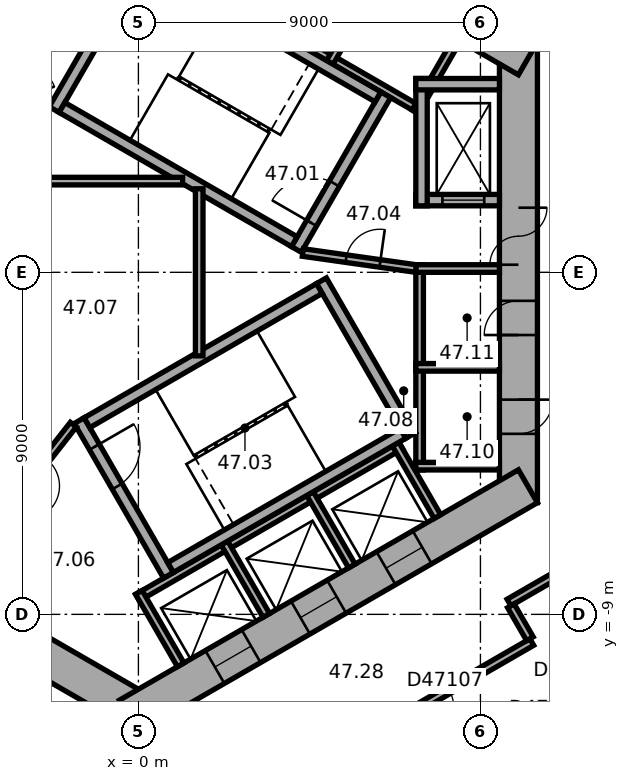
"""IFC4 building model, lengths in metres.
Left out: names, types, materials, properties, quantities, classifications, styles, units other than length and angle.
Written with IfcOpenShell. Run it as: python <this file> out.ifc"""

import sys

from ifc_helpers import new_model, si_unit, direction, frame, frame_2d, origin, place, context, subcontext, project, spatial, rectangle, extrude, element, fill, save


model = new_model("IFC4")
c1 = context("Model", 3, precision=1e-05, world=origin(), true_north=direction((0.0, 1.0)))
c2 = subcontext(c1, "Body", "Model", "MODEL_VIEW")
j1 = project(units=[si_unit("LENGTHUNIT", "METRE"), si_unit("PLANEANGLEUNIT", "RADIAN")], contexts=[c1])
p1 = place(None, origin())
s1 = spatial("IfcSite", under=j1, at=p1, CompositionType="ELEMENT")
p2 = place(p1, origin())
s2 = spatial("IfcBuilding", under=s1, at=p2, CompositionType="ELEMENT")
p3 = place(p2, frame((0.0, 0.0, 191.0)))
s3 = spatial("IfcBuildingStorey", under=s2, at=p3, CompositionType="ELEMENT", Elevation=191.0)
p4 = place(p3, frame((10.0, -6.062, 0.0), z_axis=(0.0, 0.0, 1.0), x_axis=(0.0, 1.0, 0.0)))
e1 = element("IfcWall", 1, at=p4, inside=s3, PredefinedType="SHEAR", context=c2, shape_type="SweptSolid", body=[
    extrude(rectangle(XDim=12.125, YDim=1.0, at=frame_2d((6.062, 0.0))), origin(), (0.0, 0.0, 1.0), 3.7),
])
p5 = place(p4, frame((6.262, 0.0, 0.0)))
e2 = element("IfcOpeningElement", 2, at=p5, cuts=e1, PredefinedType="OPENING", context=c2, shape_type="SweptSolid", body=[
    extrude(rectangle(XDim=1.5, YDim=2.1, at=frame_2d((0.75, 1.05))), frame((0.0, 0.51, 0.0), z_axis=(0.0, -1.0, 0.0), x_axis=(1.0, 0.0, 0.0)), (0.0, 0.0, 1.0), 1.02),
])
p6 = place(p4, frame((1.812, 0.0, 0.0)))
e3 = element("IfcOpeningElement", 3, at=p6, cuts=e1, PredefinedType="OPENING", context=c2, shape_type="SweptSolid", body=[
    extrude(rectangle(XDim=0.9, YDim=2.1, at=frame_2d((0.45, 1.05))), frame((0.0, 0.51, 0.0), z_axis=(0.0, -1.0, 0.0), x_axis=(1.0, 0.0, 0.0)), (0.0, 0.0, 1.0), 1.02),
])
p7 = place(p4, frame((4.412, 0.0, 0.0)))
e4 = element("IfcOpeningElement", 4, at=p7, cuts=e1, PredefinedType="OPENING", context=c2, shape_type="SweptSolid", body=[
    extrude(rectangle(XDim=0.9, YDim=2.1, at=frame_2d((0.45, 1.05))), frame((0.0, 0.51, 0.0), z_axis=(0.0, -1.0, 0.0), x_axis=(1.0, 0.0, 0.0)), (0.0, 0.0, 1.0), 1.02),
])
p8 = place(p3, frame((10.25, 5.629, 0.0), z_axis=(0.0, 0.0, 1.0), x_axis=(-0.866022616891, 0.50000482701, 0.0)))
e5 = element("IfcWall", 5, at=p8, inside=s3, PredefinedType="SHEAR", context=c2, shape_type="SweptSolid", body=[
    extrude(rectangle(XDim=12.125, YDim=1.0, at=frame_2d((6.062, 0.0))), origin(), (0.0, 0.0, 1.0), 3.7),
])
p9 = place(p8, frame((2.712, 0.0, 0.0)))
e6 = element("IfcOpeningElement", 6, at=p9, cuts=e5, PredefinedType="OPENING", context=c2, shape_type="SweptSolid", body=[
    extrude(rectangle(XDim=0.9, YDim=2.1, at=frame_2d((0.45, 1.05))), frame((0.0, 0.51, 0.0), z_axis=(0.0, -1.0, 0.0), x_axis=(1.0, 0.0, 0.0)), (0.0, 0.0, 1.0), 1.02),
])
p10 = place(p8, frame((6.612, 0.0, 0.0)))
e7 = element("IfcOpeningElement", 7, at=p10, cuts=e5, PredefinedType="OPENING", context=c2, shape_type="SweptSolid", body=[
    extrude(rectangle(XDim=0.9, YDim=2.1, at=frame_2d((0.45, 1.05))), frame((0.0, 0.51, 0.0), z_axis=(0.0, -1.0, 0.0), x_axis=(1.0, 0.0, 0.0)), (0.0, 0.0, 1.0), 1.02),
])
p11 = place(p3, frame((0.25, 11.691, 0.0), z_axis=(0.0, 0.0, 1.0), x_axis=(-0.866022616891, -0.50000482701, 0.0)))
e8 = element("IfcWall", 8, at=p11, inside=s3, PredefinedType="SHEAR", context=c2, shape_type="SweptSolid", body=[
    extrude(rectangle(XDim=12.125, YDim=1.0, at=frame_2d((6.062, 0.0))), origin(), (0.0, 0.0, 1.0), 3.7),
])
p12 = place(p11, frame((6.262, 0.0, 0.0)))
e9 = element("IfcOpeningElement", 9, at=p12, cuts=e8, PredefinedType="OPENING", context=c2, shape_type="SweptSolid", body=[
    extrude(rectangle(XDim=1.5, YDim=2.1, at=frame_2d((0.75, 1.05))), frame((0.0, 0.51, 0.0), z_axis=(0.0, -1.0, 0.0), x_axis=(1.0, 0.0, 0.0)), (0.0, 0.0, 1.0), 1.02),
])
p13 = place(p11, frame((1.812, 0.0, 0.0)))
e10 = element("IfcOpeningElement", 10, at=p13, cuts=e8, PredefinedType="OPENING", context=c2, shape_type="SweptSolid", body=[
    extrude(rectangle(XDim=0.9, YDim=2.1, at=frame_2d((0.45, 1.05))), frame((0.0, 0.51, 0.0), z_axis=(0.0, -1.0, 0.0), x_axis=(1.0, 0.0, 0.0)), (0.0, 0.0, 1.0), 1.02),
])
p14 = place(p11, frame((4.412, 0.0, 0.0)))
e11 = element("IfcOpeningElement", 11, at=p14, cuts=e8, PredefinedType="OPENING", context=c2, shape_type="SweptSolid", body=[
    extrude(rectangle(XDim=0.9, YDim=2.1, at=frame_2d((0.45, 1.05))), frame((0.0, 0.51, 0.0), z_axis=(0.0, -1.0, 0.0), x_axis=(1.0, 0.0, 0.0)), (0.0, 0.0, 1.0), 1.02),
])
p15 = place(p3, frame((-10.25, -5.629, 0.0), z_axis=(0.0, 0.0, 1.0), x_axis=(0.866022616891, -0.50000482701, 0.0)))
e12 = element("IfcWall", 12, at=p15, inside=s3, PredefinedType="SHEAR", context=c2, shape_type="SweptSolid", body=[
    extrude(rectangle(XDim=12.125, YDim=1.0, at=frame_2d((6.062, 0.0))), origin(), (0.0, 0.0, 1.0), 3.7),
])
p16 = place(p15, frame((6.262, 0.0, 0.0)))
e13 = element("IfcOpeningElement", 13, at=p16, cuts=e12, PredefinedType="OPENING", context=c2, shape_type="SweptSolid", body=[
    extrude(rectangle(XDim=1.5, YDim=2.1, at=frame_2d((0.75, 1.05))), frame((0.0, 0.51, 0.0), z_axis=(0.0, -1.0, 0.0), x_axis=(1.0, 0.0, 0.0)), (0.0, 0.0, 1.0), 1.02),
])
p17 = place(p15, frame((1.712, 0.0, 0.0)))
e14 = element("IfcOpeningElement", 14, at=p17, cuts=e12, PredefinedType="OPENING", context=c2, shape_type="SweptSolid", body=[
    extrude(rectangle(XDim=1.1, YDim=2.1, at=frame_2d((0.55, 1.05))), frame((0.0, 0.51, 0.0), z_axis=(0.0, -1.0, 0.0), x_axis=(1.0, 0.0, 0.0)), (0.0, 0.0, 1.0), 1.02),
])
p18 = place(p15, frame((4.312, 0.0, 0.0)))
e15 = element("IfcOpeningElement", 15, at=p18, cuts=e12, PredefinedType="OPENING", context=c2, shape_type="SweptSolid", body=[
    extrude(rectangle(XDim=1.1, YDim=2.1, at=frame_2d((0.55, 1.05))), frame((0.0, 0.51, 0.0), z_axis=(0.0, -1.0, 0.0), x_axis=(1.0, 0.0, 0.0)), (0.0, 0.0, 1.0), 1.02),
])
p19 = place(p3, frame((-0.25, -11.691, 0.0), z_axis=(0.0, 0.0, 1.0), x_axis=(0.866022616891, 0.50000482701, 0.0)))
e16 = element("IfcWall", 16, at=p19, inside=s3, PredefinedType="SHEAR", context=c2, shape_type="SweptSolid", body=[
    extrude(rectangle(XDim=12.125, YDim=1.0, at=frame_2d((6.062, 0.0))), origin(), (0.0, 0.0, 1.0), 3.7),
])
p20 = place(p19, frame((2.612, 0.0, 0.0)))
e17 = element("IfcOpeningElement", 17, at=p20, cuts=e16, PredefinedType="OPENING", context=c2, shape_type="SweptSolid", body=[
    extrude(rectangle(XDim=1.1, YDim=2.1, at=frame_2d((0.55, 1.05))), frame((0.0, 0.51, 0.0), z_axis=(0.0, -1.0, 0.0), x_axis=(1.0, 0.0, 0.0)), (0.0, 0.0, 1.0), 1.02),
])
p21 = place(p19, frame((5.212, 0.0, 0.0)))
e18 = element("IfcOpeningElement", 18, at=p21, cuts=e16, PredefinedType="OPENING", context=c2, shape_type="SweptSolid", body=[
    extrude(rectangle(XDim=1.1, YDim=2.1, at=frame_2d((0.55, 1.05))), frame((0.0, 0.51, 0.0), z_axis=(0.0, -1.0, 0.0), x_axis=(1.0, 0.0, 0.0)), (0.0, 0.0, 1.0), 1.02),
])
p22 = place(p19, frame((7.812, 0.0, 0.0)))
e19 = element("IfcOpeningElement", 19, at=p22, cuts=e16, PredefinedType="OPENING", context=c2, shape_type="SweptSolid", body=[
    extrude(rectangle(XDim=1.1, YDim=2.1, at=frame_2d((0.55, 1.05))), frame((0.0, 0.51, 0.0), z_axis=(0.0, -1.0, 0.0), x_axis=(1.0, 0.0, 0.0)), (0.0, 0.0, 1.0), 1.02),
])
p23 = place(p3, frame((7.4, -5.2, 0.0), z_axis=(0.0, 0.0, 1.0), x_axis=(0.0, 1.0, 0.0)))
e20 = element("IfcWall", 20, at=p23, inside=s3, PredefinedType="PARTITIONING", context=c2, shape_type="SweptSolid", body=[
    extrude(rectangle(XDim=5.4, YDim=0.2, at=frame_2d((2.7, 0.0))), origin(), (0.0, 0.0, 1.0), 3.42),
])
for number, where, z_axis, x_axis in (
    (21, (7.3, -5.1, 0.0), (0.0, 0.0, 1.0), (1.0, 0.0, 0.0)),
    (22, (7.3, -2.5, 0.0), (0.0, 0.0, 1.0), (1.0, 0.0, 0.0)),
    (23, (7.3, 0.1, 0.0), (0.0, 0.0, 1.0), (1.0, 0.0, 0.0)),
):
    element("IfcWall", number, at=place(p3, frame(where, z_axis=z_axis, x_axis=x_axis)), inside=s3, PredefinedType="PARTITIONING", context=c2, shape_type="SweptSolid", body=[
        extrude(rectangle(XDim=2.2, YDim=0.2, at=frame_2d((1.1, 0.0))), origin(), (0.0, 0.0, 1.0), 3.42),
    ])
p24 = place(p3, frame((7.424, 4.259, 0.0), z_axis=(0.0, 0.0, 1.0), x_axis=(-0.866026010844, 0.49999894854, 0.0)))
e24 = element("IfcWall", 24, at=p24, inside=s3, PredefinedType="PARTITIONING", context=c2, shape_type="SweptSolid", body=[
    extrude(rectangle(XDim=8.0, YDim=0.2, at=frame_2d((4.0, 0.0))), origin(), (0.0, 0.0, 1.0), 3.42),
])
for number, where, z_axis, x_axis in (
    (25, (7.287, 4.222, 0.0), (0.0, 0.0, 1.0), (0.5, 0.866, 0.0)),
    (26, (5.036, 5.522, 0.0), (0.0, 0.0, 1.0), (0.5, 0.866, 0.0)),
):
    element("IfcWall", number, at=place(p3, frame(where, z_axis=z_axis, x_axis=x_axis)), inside=s3, PredefinedType="PARTITIONING", context=c2, shape_type="SweptSolid", body=[
        extrude(rectangle(XDim=2.2, YDim=0.2, at=frame_2d((1.1, 0.0))), origin(), (0.0, 0.0, 1.0), 3.42),
    ])
p25 = place(p3, frame((-0.024, -8.559, 0.0), z_axis=(0.0, 0.0, 1.0), x_axis=(0.866026010844, 0.49999894854, 0.0)))
e27 = element("IfcWall", 27, at=p25, inside=s3, PredefinedType="PARTITIONING", context=c2, shape_type="SweptSolid", body=[
    extrude(rectangle(XDim=8.0, YDim=0.2, at=frame_2d((4.0, 0.0))), origin(), (0.0, 0.0, 1.0), 3.42),
])
for number, where, z_axis, x_axis in (
    (28, (0.013, -8.422, 0.0), (0.0, 0.0, 1.0), (0.5, -0.866, 0.0)),
    (29, (2.264, -7.122, 0.0), (0.0, 0.0, 1.0), (0.5, -0.866, 0.0)),
    (30, (4.516, -5.822, 0.0), (0.0, 0.0, 1.0), (0.5, -0.866, 0.0)),
    (31, (6.768, -4.522, 0.0), (0.0, 0.0, 1.0), (0.5, -0.866, 0.0)),
):
    element("IfcWall", number, at=place(p3, frame(where, z_axis=z_axis, x_axis=x_axis)), inside=s3, PredefinedType="PARTITIONING", context=c2, shape_type="SweptSolid", body=[
        extrude(rectangle(XDim=2.2, YDim=0.2, at=frame_2d((1.1, 0.0))), origin(), (0.0, 0.0, 1.0), 3.42),
    ])
p26 = place(p3, frame((4.158, 0.602, 0.0), z_axis=(0.0, 0.0, 1.0), x_axis=(0.499977259774, 0.866038532462, 0.0)))
e32 = element("IfcWall", 32, at=p26, inside=s3, PredefinedType="SHEAR", context=c2, shape_type="SweptSolid", body=[
    extrude(rectangle(XDim=4.7, YDim=0.3, at=frame_2d((2.35, 0.0))), origin(), (0.0, 0.0, 1.0), 3.42),
])
p27 = place(p26, frame((0.8, 0.0, 0.0)))
e33 = element("IfcOpeningElement", 33, at=p27, cuts=e32, PredefinedType="OPENING", context=c2, shape_type="SweptSolid", body=[
    extrude(rectangle(XDim=1.2, YDim=2.1, at=frame_2d((0.6, 1.05))), frame((0.0, 0.16, 0.0), z_axis=(0.0, -1.0, 0.0), x_axis=(1.0, 0.0, 0.0)), (0.0, 0.0, 1.0), 0.32),
])
p28 = place(p3, frame((-2.216, 4.282, 0.0), z_axis=(0.0, 0.0, 1.0), x_axis=(0.499977259774, 0.866038532462, 0.0)))
e34 = element("IfcWall", 34, at=p28, inside=s3, PredefinedType="SHEAR", context=c2, shape_type="SweptSolid", body=[
    extrude(rectangle(XDim=4.7, YDim=0.3, at=frame_2d((2.35, 0.0))), origin(), (0.0, 0.0, 1.0), 3.42),
])
for number, where, z_axis, x_axis in (
    (35, (4.103, 0.807, 0.0), (0.0, 0.0, 1.0), (-0.866, 0.5, 0.0)),
    (36, (6.303, 4.617, 0.0), (0.0, 0.0, 1.0), (-0.866, 0.5, 0.0)),
):
    element("IfcWall", number, at=place(p3, frame(where, z_axis=z_axis, x_axis=x_axis)), inside=s3, PredefinedType="SHEAR", context=c2, shape_type="SweptSolid", body=[
        extrude(rectangle(XDim=7.06, YDim=0.3, at=frame_2d((3.53, 0.0))), origin(), (0.0, 0.0, 1.0), 3.42),
    ])
p29 = place(p3, frame((-1.558, -3.902, 0.0), z_axis=(0.0, 0.0, 1.0), x_axis=(0.499977259774, -0.866038532462, 0.0)))
e37 = element("IfcWall", 37, at=p29, inside=s3, PredefinedType="SHEAR", context=c2, shape_type="SweptSolid", body=[
    extrude(rectangle(XDim=4.7, YDim=0.3, at=frame_2d((2.35, 0.0))), origin(), (0.0, 0.0, 1.0), 3.42),
])
p30 = place(p29, frame((0.8, 0.0, 0.0)))
e38 = element("IfcOpeningElement", 38, at=p30, cuts=e37, PredefinedType="OPENING", context=c2, shape_type="SweptSolid", body=[
    extrude(rectangle(XDim=1.2, YDim=2.1, at=frame_2d((0.6, 1.05))), frame((0.0, 0.16, 0.0), z_axis=(0.0, -1.0, 0.0), x_axis=(1.0, 0.0, 0.0)), (0.0, 0.0, 1.0), 0.32),
])
p31 = place(p3, frame((4.816, -0.222, 0.0), z_axis=(0.0, 0.0, 1.0), x_axis=(0.499977259774, -0.866038532462, 0.0)))
e39 = element("IfcWall", 39, at=p31, inside=s3, PredefinedType="SHEAR", context=c2, shape_type="SweptSolid", body=[
    extrude(rectangle(XDim=4.7, YDim=0.3, at=frame_2d((2.35, 0.0))), origin(), (0.0, 0.0, 1.0), 3.42),
])
for number, where, z_axis, x_axis in (
    (40, (-1.353, -3.957, 0.0), (0.0, 0.0, 1.0), (0.866, 0.5, 0.0)),
    (41, (0.847, -7.767, 0.0), (0.0, 0.0, 1.0), (0.866, 0.5, 0.0)),
):
    element("IfcWall", number, at=place(p3, frame(where, z_axis=z_axis, x_axis=x_axis)), inside=s3, PredefinedType="SHEAR", context=c2, shape_type="SweptSolid", body=[
        extrude(rectangle(XDim=7.06, YDim=0.3, at=frame_2d((3.53, 0.0))), origin(), (0.0, 0.0, 1.0), 3.42),
    ])
p32 = place(p3, frame((7.3, 1.9, 0.0), z_axis=(0.0, 0.0, 1.0), x_axis=(1.0, 0.0, 0.0)))
e42 = element("IfcWall", 42, at=p32, inside=s3, PredefinedType="SHEAR", context=c2, shape_type="SweptSolid", body=[
    extrude(rectangle(XDim=2.2, YDim=0.3, at=frame_2d((1.1, 0.0))), origin(), (0.0, 0.0, 1.0), 3.42),
])
p33 = place(p32, frame((0.7, 0.0, 0.0)))
e43 = element("IfcOpeningElement", 43, at=p33, cuts=e42, PredefinedType="OPENING", context=c2, shape_type="SweptSolid", body=[
    extrude(rectangle(XDim=1.1, YDim=2.1, at=frame_2d((0.55, 1.05))), frame((0.0, 0.16, 0.0), z_axis=(0.0, -1.0, 0.0), x_axis=(1.0, 0.0, 0.0)), (0.0, 0.0, 1.0), 0.32),
])
p34 = place(p3, frame((7.45, 1.75, 0.0), z_axis=(0.0, 0.0, 1.0), x_axis=(0.0, 1.0, 0.0)))
e44 = element("IfcWall", 44, at=p34, inside=s3, PredefinedType="SHEAR", context=c2, shape_type="SweptSolid", body=[
    extrude(rectangle(XDim=3.35, YDim=0.3, at=frame_2d((1.675, 0.0))), origin(), (0.0, 0.0, 1.0), 3.42),
])
p35 = place(p3, frame((7.3, 4.95, 0.0), z_axis=(0.0, 0.0, 1.0), x_axis=(1.0, 0.0, 0.0)))
e45 = element("IfcWall", 45, at=p35, inside=s3, PredefinedType="SHEAR", context=c2, shape_type="SweptSolid", body=[
    extrude(rectangle(XDim=2.2, YDim=0.3, at=frame_2d((1.1, 0.0))), origin(), (0.0, 0.0, 1.0), 3.42),
])
p36 = place(p3, frame((4.327, 0.521, 0.0), z_axis=(0.0, 0.0, 1.0), x_axis=(0.990124376366, -0.14019172346, 0.0)))
e46 = element("IfcWall", 46, at=p36, inside=s3, PredefinedType="PARTITIONING", context=c2, shape_type="SweptSolid", body=[
    extrude(rectangle(XDim=3.002, YDim=0.2, at=frame_2d((1.501, 0.0))), origin(), (0.0, 0.0, 1.0), 3.42),
])
p37 = place(p36, frame((1.15, 0.0, 0.0)))
e47 = element("IfcOpeningElement", 47, at=p37, cuts=e46, PredefinedType="OPENING", context=c2, shape_type="SweptSolid", body=[
    extrude(rectangle(XDim=0.9, YDim=2.1, at=frame_2d((0.45, 1.05))), frame((0.0, 0.11, 0.0), z_axis=(0.0, -1.0, 0.0), x_axis=(1.0, 0.0, 0.0)), (0.0, 0.0, 1.0), 0.22),
])
p38 = place(p3, frame((-1.712, -4.008, 0.0), z_axis=(0.0, 0.0, 1.0), x_axis=(-0.616549420702, -0.787316208287, 0.0)))
e48 = element("IfcWall", 48, at=p38, inside=s3, PredefinedType="PARTITIONING", context=c2, shape_type="SweptSolid", body=[
    extrude(rectangle(XDim=3.002, YDim=0.2, at=frame_2d((1.501, 0.0))), origin(), (0.0, 0.0, 1.0), 3.42),
])
p39 = place(p38, frame((1.15, 0.0, 0.0)))
e49 = element("IfcOpeningElement", 49, at=p39, cuts=e48, PredefinedType="OPENING", context=c2, shape_type="SweptSolid", body=[
    extrude(rectangle(XDim=0.9, YDim=2.1, at=frame_2d((0.45, 1.05))), frame((0.0, 0.11, 0.0), z_axis=(0.0, -1.0, 0.0), x_axis=(1.0, 0.0, 0.0)), (0.0, 0.0, 1.0), 0.22),
])
p40 = place(p3, frame((-2.72, 2.4, 0.0), z_axis=(0.0, 0.0, 1.0), x_axis=(1.0, 0.0, 0.0)))
e50 = element("IfcWall", 50, at=p40, inside=s3, PredefinedType="PARTITIONING", context=c2, shape_type="SweptSolid", body=[
    extrude(rectangle(XDim=3.883, YDim=0.2, at=frame_2d((1.941, 0.0))), origin(), (0.0, 0.0, 1.0), 3.42),
])
p41 = place(p3, frame((1.6, -2.198, 0.0), z_axis=(0.0, 0.0, 1.0), x_axis=(0.0, 1.0, 0.0)))
e51 = element("IfcWall", 51, at=p41, inside=s3, PredefinedType="PARTITIONING", context=c2, shape_type="SweptSolid", body=[
    extrude(rectangle(XDim=4.397, YDim=0.2, at=frame_2d((2.198, 0.0))), origin(), (0.0, 0.0, 1.0), 3.42),
])
p42 = place(p3, frame((2.816, -14.079, 0.0), z_axis=(0.0, 0.0, 1.0), x_axis=(0.866021128829, 0.500007404367, 0.0)))
e52 = element("IfcWall", 52, at=p42, inside=s3, PredefinedType="PARTITIONING", context=c2, shape_type="SweptSolid", body=[
    extrude(rectangle(XDim=8.702, YDim=0.2, at=frame_2d((4.351, 0.0))), origin(), (0.0, 0.0, 1.0), 3.42),
])
p43 = place(p42, frame((5.184, 0.0, 0.0)))
e53 = element("IfcOpeningElement", 53, at=p43, cuts=e52, PredefinedType="OPENING", context=c2, shape_type="SweptSolid", body=[
    extrude(rectangle(XDim=1.0, YDim=2.1, at=frame_2d((0.5, 1.05))), frame((0.0, 0.11, 0.0), z_axis=(0.0, -1.0, 0.0), x_axis=(1.0, 0.0, 0.0)), (0.0, 0.0, 1.0), 0.22),
])
p44 = place(p3, frame((6.152, -14.116, 0.0), z_axis=(0.0, 0.0, 1.0), x_axis=(0.866026788224, 0.499997602072, 0.0)))
e54 = element("IfcWall", 54, at=p44, inside=s3, PredefinedType="PARTITIONING", context=c2, shape_type="SweptSolid", body=[
    extrude(rectangle(XDim=7.322, YDim=0.12, at=frame_2d((3.661, 0.0))), origin(), (0.0, 0.0, 1.0), 3.42),
])
p45 = place(p44, frame((5.858, 0.0, 0.0)))
e55 = element("IfcOpeningElement", 55, at=p45, cuts=e54, PredefinedType="OPENING", context=c2, shape_type="SweptSolid", body=[
    extrude(rectangle(XDim=1.0, YDim=2.1, at=frame_2d((0.5, 1.05))), frame((0.0, 0.07, 0.0), z_axis=(0.0, -1.0, 0.0), x_axis=(1.0, 0.0, 0.0)), (0.0, 0.0, 1.0), 0.14),
])
p46 = place(p44, frame((1.2, 0.0, 0.0)))
e56 = element("IfcOpeningElement", 56, at=p46, cuts=e54, PredefinedType="OPENING", context=c2, shape_type="SweptSolid", body=[
    extrude(rectangle(XDim=0.9, YDim=2.1, at=frame_2d((0.45, 1.05))), frame((0.0, 0.07, 0.0), z_axis=(0.0, -1.0, 0.0), x_axis=(1.0, 0.0, 0.0)), (0.0, 0.0, 1.0), 0.14),
])
p47 = place(p44, frame((3.897, 0.0, 0.0)))
e57 = element("IfcOpeningElement", 57, at=p47, cuts=e54, PredefinedType="OPENING", context=c2, shape_type="SweptSolid", body=[
    extrude(rectangle(XDim=0.9, YDim=2.1, at=frame_2d((0.45, 1.05))), frame((0.0, 0.07, 0.0), z_axis=(0.0, -1.0, 0.0), x_axis=(1.0, 0.0, 0.0)), (0.0, 0.0, 1.0), 0.14),
])
p48 = place(p3, frame((9.752, -8.688, 0.0), z_axis=(0.0, 0.0, 1.0), x_axis=(0.865974105138, 0.500088841337, 0.0)))
e58 = element("IfcWall", 58, at=p48, inside=s3, PredefinedType="PARTITIONING", context=c2, shape_type="SweptSolid", body=[
    extrude(rectangle(XDim=1.961, YDim=0.2, at=frame_2d((0.98, 0.0))), origin(), (0.0, 0.0, 1.0), 3.42),
])
p49 = place(p3, frame((10.302, -9.642, 0.0), z_axis=(0.0, 0.0, 1.0), x_axis=(-0.500074377092, 0.865982457891, 0.0)))
e59 = element("IfcWall", 59, at=p49, inside=s3, PredefinedType="PARTITIONING", context=c2, shape_type="SweptSolid", body=[
    extrude(rectangle(XDim=1.001, YDim=0.2, at=frame_2d((0.5, 0.0))), origin(), (0.0, 0.0, 1.0), 3.42),
])
p50 = place(p5, origin())
e60 = element("IfcDoor", 60, at=p50, inside=s3, OperationType="DOUBLE_DOOR_SINGLE_SWING", PredefinedType="DOOR", context=c2, shape_type="SweptSolid", body=[
    extrude(rectangle(XDim=1.5, YDim=2.1, at=frame_2d((0.75, 1.05))), frame((0.0, 0.025, 0.0), z_axis=(0.0, -1.0, 0.0), x_axis=(1.0, 0.0, 0.0)), (0.0, 0.0, 1.0), 0.05),
])
fill(e2, e60)
p51 = place(p27, origin())
e61 = element("IfcDoor", 61, at=p51, inside=s3, OperationType="SINGLE_SWING_RIGHT", PredefinedType="DOOR", context=c2, shape_type="SweptSolid", body=[
    extrude(rectangle(XDim=1.2, YDim=2.1, at=frame_2d((0.6, 1.05))), frame((0.0, 0.025, 0.0), z_axis=(0.0, -1.0, 0.0), x_axis=(1.0, 0.0, 0.0)), (0.0, 0.0, 1.0), 0.05),
])
fill(e33, e61)
p52 = place(p30, origin())
e62 = element("IfcDoor", 62, at=p52, inside=s3, OperationType="SINGLE_SWING_RIGHT", PredefinedType="DOOR", context=c2, shape_type="SweptSolid", body=[
    extrude(rectangle(XDim=1.2, YDim=2.1, at=frame_2d((0.6, 1.05))), frame((0.0, 0.025, 0.0), z_axis=(0.0, -1.0, 0.0), x_axis=(1.0, 0.0, 0.0)), (0.0, 0.0, 1.0), 0.05),
])
fill(e38, e62)
p53 = place(p37, origin())
e63 = element("IfcDoor", 63, at=p53, inside=s3, OperationType="SINGLE_SWING_LEFT", PredefinedType="DOOR", context=c2, shape_type="SweptSolid", body=[
    extrude(rectangle(XDim=0.9, YDim=2.1, at=frame_2d((0.45, 1.05))), frame((0.0, 0.025, 0.0), z_axis=(0.0, -1.0, 0.0), x_axis=(1.0, 0.0, 0.0)), (0.0, 0.0, 1.0), 0.05),
])
fill(e47, e63)
p54 = place(p6, origin())
e64 = element("IfcDoor", 64, at=p54, inside=s3, OperationType="SINGLE_SWING_LEFT", PredefinedType="DOOR", context=c2, shape_type="SweptSolid", body=[
    extrude(rectangle(XDim=0.9, YDim=2.1, at=frame_2d((0.45, 1.05))), frame((0.0, 0.025, 0.0), z_axis=(0.0, -1.0, 0.0), x_axis=(1.0, 0.0, 0.0)), (0.0, 0.0, 1.0), 0.05),
])
fill(e3, e64)
p55 = place(p7, origin())
e65 = element("IfcDoor", 65, at=p55, inside=s3, OperationType="SINGLE_SWING_LEFT", PredefinedType="DOOR", context=c2, shape_type="SweptSolid", body=[
    extrude(rectangle(XDim=0.9, YDim=2.1, at=frame_2d((0.45, 1.05))), frame((0.0, 0.025, 0.0), z_axis=(0.0, -1.0, 0.0), x_axis=(1.0, 0.0, 0.0)), (0.0, 0.0, 1.0), 0.05),
])
fill(e4, e65)
p56 = place(p33, origin())
e66 = element("IfcDoor", 66, at=p56, inside=s3, OperationType="DOUBLE_DOOR_SLIDING", PredefinedType="DOOR", context=c2, shape_type="SweptSolid", body=[
    extrude(rectangle(XDim=1.1, YDim=2.1, at=frame_2d((0.55, 1.05))), frame((0.0, 0.025, 0.0), z_axis=(0.0, -1.0, 0.0), x_axis=(1.0, 0.0, 0.0)), (0.0, 0.0, 1.0), 0.05),
])
fill(e43, e66)
p57 = place(p20, origin())
e67 = element("IfcDoor", 67, at=p57, inside=s3, OperationType="DOUBLE_DOOR_SLIDING", PredefinedType="DOOR", context=c2, shape_type="SweptSolid", body=[
    extrude(rectangle(XDim=1.1, YDim=2.1, at=frame_2d((0.55, 1.05))), frame((0.0, 0.025, 0.0), z_axis=(0.0, -1.0, 0.0), x_axis=(1.0, 0.0, 0.0)), (0.0, 0.0, 1.0), 0.05),
])
fill(e17, e67)
p58 = place(p21, origin())
e68 = element("IfcDoor", 68, at=p58, inside=s3, OperationType="DOUBLE_DOOR_SLIDING", PredefinedType="DOOR", context=c2, shape_type="SweptSolid", body=[
    extrude(rectangle(XDim=1.1, YDim=2.1, at=frame_2d((0.55, 1.05))), frame((0.0, 0.025, 0.0), z_axis=(0.0, -1.0, 0.0), x_axis=(1.0, 0.0, 0.0)), (0.0, 0.0, 1.0), 0.05),
])
fill(e18, e68)
p59 = place(p22, origin())
e69 = element("IfcDoor", 69, at=p59, inside=s3, OperationType="DOUBLE_DOOR_SLIDING", PredefinedType="DOOR", context=c2, shape_type="SweptSolid", body=[
    extrude(rectangle(XDim=1.1, YDim=2.1, at=frame_2d((0.55, 1.05))), frame((0.0, 0.025, 0.0), z_axis=(0.0, -1.0, 0.0), x_axis=(1.0, 0.0, 0.0)), (0.0, 0.0, 1.0), 0.05),
])
fill(e19, e69)
p60 = place(p43, origin())
e70 = element("IfcDoor", 70, at=p60, inside=s3, OperationType="SINGLE_SWING_LEFT", PredefinedType="DOOR", context=c2, shape_type="SweptSolid", body=[
    extrude(rectangle(XDim=1.0, YDim=2.1, at=frame_2d((0.5, 1.05))), frame((0.0, 0.025, 0.0), z_axis=(0.0, -1.0, 0.0), x_axis=(1.0, 0.0, 0.0)), (0.0, 0.0, 1.0), 0.05),
])
fill(e53, e70)
save(model, sys.argv[1])
